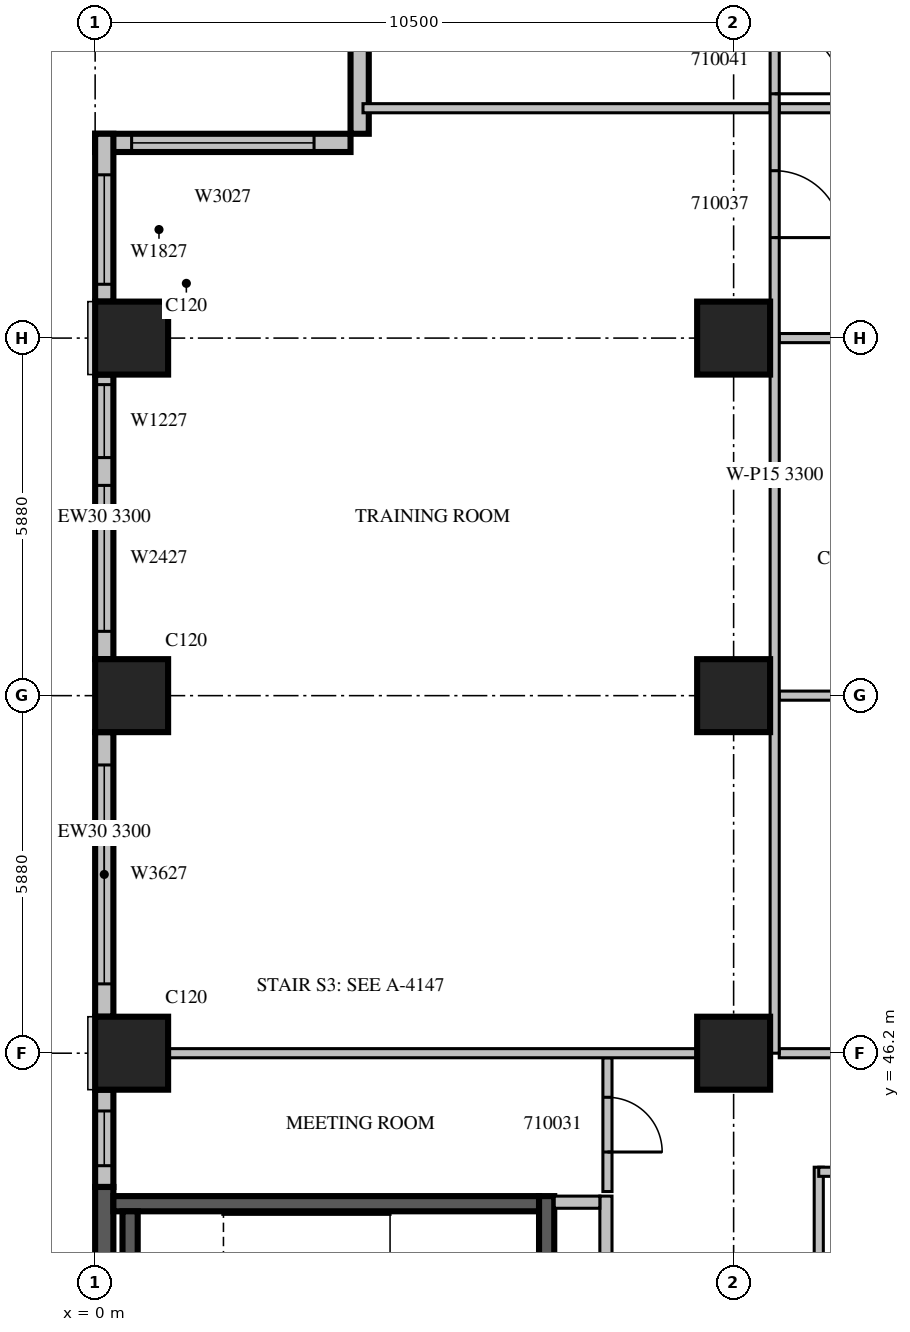
"""IFC4 building model, lengths in metres.
Left out: names, types, materials, properties, quantities, classifications, styles, units other than length and angle.
Written with IfcOpenShell. Run it as: python <this file> out.ifc"""

import sys

from ifc_helpers import new_model, si_unit, direction, frame, frame_2d, origin, origin_2d, place, context, subcontext, project, spatial, rectangle, extrude, source, transform, mapped, element, fill, save


model = new_model("IFC4")
c1 = context("Model", 3, precision=1e-05, world=origin(), true_north=direction((0.0, 1.0)))
c2 = subcontext(c1, "Body", "Model", "MODEL_VIEW")
j1 = project(units=[si_unit("LENGTHUNIT", "METRE"), si_unit("PLANEANGLEUNIT", "RADIAN")], contexts=[c1])
p1 = place(None, origin())
s1 = spatial("IfcSite", under=j1, at=p1, CompositionType="ELEMENT")
p2 = place(p1, origin())
s2 = spatial("IfcBuilding", under=s1, at=p2, CompositionType="ELEMENT")
p3 = place(p2, frame((0.0, 0.0, 53.1)))
s3 = spatial("IfcBuildingStorey", under=s2, at=p3, CompositionType="ELEMENT", Elevation=53.1)
m1 = source(origin(), c2, "Body", "SweptSolid", [
    extrude(rectangle(XDim=1.2, YDim=1.2, at=origin_2d()), origin(), (0.0, 0.0, 1.0), 4.2),
])
for number, where, z_axis, x_axis in (
    (1, (0.6, 46.2, 0.0), (0.0, 0.0, 1.0), (1.0, 0.0, 0.0)),
    (2, (10.5, 46.2, 0.0), (0.0, 0.0, 1.0), (1.0, 0.0, 0.0)),
    (3, (0.6, 52.08, 0.0), (0.0, 0.0, 1.0), (1.0, 0.0, 0.0)),
    (4, (10.5, 52.08, 0.0), (0.0, 0.0, 1.0), (1.0, 0.0, 0.0)),
    (5, (0.6, 57.96, 0.0), (0.0, 0.0, 1.0), (1.0, 0.0, 0.0)),
    (6, (10.5, 57.96, 0.0), (0.0, 0.0, 1.0), (1.0, 0.0, 0.0)),
):
    element("IfcColumn", number, at=place(p3, frame(where, z_axis=z_axis, x_axis=x_axis)), inside=s3, PredefinedType="COLUMN", context=c2, shape_type="MappedRepresentation", body=[
        mapped(m1, transform((0.0, 0.0, 0.0), scale=1.0)),
    ])
m2 = source(origin(), c2, "Body", "SweptSolid", [
    extrude(rectangle(XDim=4.2, YDim=0.3, at=frame_2d((2.1, 0.0))), origin(), (0.0, 0.0, 1.0), 3.8),
])
p4 = place(p3, frame((4.35, 65.52, 0.0), z_axis=(0.0, 0.0, 1.0), x_axis=(0.0, -1.0, 0.0)))
e7 = element("IfcWall", 7, at=p4, inside=s3, PredefinedType="STANDARD", context=c2, shape_type="MappedRepresentation", body=[
    mapped(m2, transform((0.0, 0.0, 0.0), scale=1.0)),
])
m3 = source(origin(), c2, "Body", "SweptSolid", [
    extrude(rectangle(XDim=1.2, YDim=2.7, at=frame_2d((0.6, 1.35))), frame((0.0, 0.16, 0.0), z_axis=(0.0, -1.0, 0.0), x_axis=(1.0, 0.0, 0.0)), (0.0, 0.0, 1.0), 0.32),
])
p5 = place(p4, frame((0.66, 0.0, 0.6)))
e8 = element("IfcOpeningElement", 8, at=p5, cuts=e7, PredefinedType="OPENING", context=c2, shape_type="MappedRepresentation", body=[
    mapped(m3, transform((0.0, 0.0, 0.0), scale=1.0)),
])
p6 = place(p3, frame((4.2, 61.17, 0.0), z_axis=(0.0, 0.0, 1.0), x_axis=(-1.0, 0.0, 0.0)))
e9 = element("IfcWall", 9, at=p6, inside=s3, PredefinedType="STANDARD", context=c2, shape_type="MappedRepresentation", body=[
    mapped(m2, transform((0.0, 0.0, 0.0), scale=1.0)),
])
m4 = source(origin(), c2, "Body", "SweptSolid", [
    extrude(rectangle(XDim=3.0, YDim=2.7, at=frame_2d((1.5, 1.35))), frame((0.0, 0.16, 0.0), z_axis=(0.0, -1.0, 0.0), x_axis=(1.0, 0.0, 0.0)), (0.0, 0.0, 1.0), 0.32),
])
p7 = place(p6, frame((0.6, 0.0, 0.6)))
e10 = element("IfcOpeningElement", 10, at=p7, cuts=e9, PredefinedType="OPENING", context=c2, shape_type="MappedRepresentation", body=[
    mapped(m4, transform((0.0, 0.0, 0.0), scale=1.0)),
])
m5 = source(origin(), c2, "Body", "SweptSolid", [
    extrude(rectangle(XDim=2.76, YDim=0.3, at=frame_2d((1.38, 0.0))), origin(), (0.0, 0.0, 1.0), 3.8),
])
p8 = place(p3, frame((0.15, 61.32, 0.0), z_axis=(0.0, 0.0, 1.0), x_axis=(0.0, -1.0, 0.0)))
e11 = element("IfcWall", 11, at=p8, inside=s3, PredefinedType="STANDARD", context=c2, shape_type="MappedRepresentation", body=[
    mapped(m5, transform((0.0, 0.0, 0.0), scale=1.0)),
])
m6 = source(origin(), c2, "Body", "SweptSolid", [
    extrude(rectangle(XDim=1.8, YDim=2.7, at=frame_2d((0.9, 1.35))), frame((0.0, 0.16, 0.0), z_axis=(0.0, -1.0, 0.0), x_axis=(1.0, 0.0, 0.0)), (0.0, 0.0, 1.0), 0.32),
])
p9 = place(p8, frame((0.675, 0.0, 0.6)))
e12 = element("IfcOpeningElement", 12, at=p9, cuts=e11, PredefinedType="OPENING", context=c2, shape_type="MappedRepresentation", body=[
    mapped(m6, transform((0.0, 0.0, 0.0), scale=1.0)),
])
m7 = source(origin(), c2, "Body", "SweptSolid", [
    extrude(rectangle(XDim=4.68, YDim=0.3, at=frame_2d((2.34, 0.0))), origin(), (0.0, 0.0, 1.0), 3.3),
])
p10 = place(p3, frame((0.15, 57.36, 0.0), z_axis=(0.0, 0.0, 1.0), x_axis=(0.0, -1.0, 0.0)))
e13 = element("IfcWall", 13, at=p10, inside=s3, PredefinedType="STANDARD", context=c2, shape_type="MappedRepresentation", body=[
    mapped(m7, transform((0.0, 0.0, 0.0), scale=1.0)),
])
p11 = place(p10, frame((0.165, 0.0, 0.6)))
e14 = element("IfcOpeningElement", 14, at=p11, cuts=e13, PredefinedType="OPENING", context=c2, shape_type="MappedRepresentation", body=[
    mapped(m3, transform((0.0, 0.0, 0.0), scale=1.0)),
])
m8 = source(origin(), c2, "Body", "SweptSolid", [
    extrude(rectangle(XDim=2.4, YDim=2.7, at=frame_2d((1.2, 1.35))), frame((0.0, 0.16, 0.0), z_axis=(0.0, -1.0, 0.0), x_axis=(1.0, 0.0, 0.0)), (0.0, 0.0, 1.0), 0.32),
])
p12 = place(p10, frame((1.823, 0.0, 0.6)))
e15 = element("IfcOpeningElement", 15, at=p12, cuts=e13, PredefinedType="OPENING", context=c2, shape_type="MappedRepresentation", body=[
    mapped(m8, transform((0.0, 0.0, 0.0), scale=1.0)),
])
p13 = place(p3, frame((0.15, 51.48, 0.0), z_axis=(0.0, 0.0, 1.0), x_axis=(0.0, -1.0, 0.0)))
e16 = element("IfcWall", 16, at=p13, inside=s3, PredefinedType="STANDARD", context=c2, shape_type="MappedRepresentation", body=[
    mapped(m7, transform((0.0, 0.0, 0.0), scale=1.0)),
])
m9 = source(origin(), c2, "Body", "SweptSolid", [
    extrude(rectangle(XDim=3.6, YDim=2.7, at=frame_2d((1.8, 1.35))), frame((0.0, 0.16, 0.0), z_axis=(0.0, -1.0, 0.0), x_axis=(1.0, 0.0, 0.0)), (0.0, 0.0, 1.0), 0.32),
])
p14 = place(p13, frame((0.54, 0.0, 0.6)))
e17 = element("IfcOpeningElement", 17, at=p14, cuts=e16, PredefinedType="OPENING", context=c2, shape_type="MappedRepresentation", body=[
    mapped(m9, transform((0.0, 0.0, 0.0), scale=1.0)),
])
m10 = source(origin(), c2, "Body", "SweptSolid", [
    extrude(rectangle(XDim=1.6, YDim=0.3, at=frame_2d((0.8, 0.0))), origin(), (0.0, 0.0, 1.0), 3.8),
])
p15 = place(p3, frame((0.15, 45.6, 0.0), z_axis=(0.0, 0.0, 1.0), x_axis=(0.0, -1.0, 0.0)))
e18 = element("IfcWall", 18, at=p15, inside=s3, PredefinedType="STANDARD", context=c2, shape_type="MappedRepresentation", body=[
    mapped(m10, transform((0.0, 0.0, 0.0), scale=1.0)),
])
m11 = source(origin(), c2, "Body", "SweptSolid", [
    extrude(rectangle(XDim=0.9, YDim=2.7, at=frame_2d((0.45, 1.35))), frame((0.0, 0.16, 0.0), z_axis=(0.0, -1.0, 0.0), x_axis=(1.0, 0.0, 0.0)), (0.0, 0.0, 1.0), 0.32),
])
p16 = place(p15, frame((0.35, 0.0, 0.6)))
e19 = element("IfcOpeningElement", 19, at=p16, cuts=e18, PredefinedType="OPENING", context=c2, shape_type="MappedRepresentation", body=[
    mapped(m11, transform((0.0, 0.0, 0.0), scale=1.0)),
])
m12 = source(origin(), c2, "Body", "SweptSolid", [
    extrude(rectangle(XDim=3.8, YDim=0.3, at=frame_2d((1.9, 0.0))), origin(), (0.0, 0.0, 1.0), 3.8),
])
p17 = place(p3, frame((0.15, 44.0, 0.0), z_axis=(0.0, 0.0, 1.0), x_axis=(0.0, -1.0, 0.0)))
e20 = element("IfcWall", 20, at=p17, inside=s3, PredefinedType="SOLIDWALL", context=c2, shape_type="MappedRepresentation", body=[
    mapped(m12, transform((0.0, 0.0, 0.0), scale=1.0)),
])
m13 = source(origin(), c2, "Body", "SweptSolid", [
    extrude(rectangle(XDim=7.0, YDim=0.25, at=frame_2d((3.5, 0.0))), origin(), (0.0, 0.0, 1.0), 3.8),
])
p18 = place(p3, frame((0.3, 43.725, 0.0), z_axis=(0.0, 0.0, 1.0), x_axis=(1.0, 0.0, 0.0)))
e21 = element("IfcWall", 21, at=p18, inside=s3, PredefinedType="SOLIDWALL", context=c2, shape_type="MappedRepresentation", body=[
    mapped(m13, transform((0.0, 0.0, 0.0), scale=1.0)),
])
m14 = source(origin(), c2, "Body", "SweptSolid", [
    extrude(rectangle(XDim=3.45, YDim=0.25, at=frame_2d((1.725, 0.0))), origin(), (0.0, 0.0, 1.0), 3.8),
])
p19 = place(p3, frame((7.425, 40.4, 0.0), z_axis=(0.0, 0.0, 1.0), x_axis=(0.0, 1.0, 0.0)))
e22 = element("IfcWall", 22, at=p19, inside=s3, PredefinedType="SOLIDWALL", context=c2, shape_type="MappedRepresentation", body=[
    mapped(m14, transform((0.0, 0.0, 0.0), scale=1.0)),
])
m15 = source(origin(), c2, "Body", "SweptSolid", [
    extrude(rectangle(XDim=2.95, YDim=0.25, at=frame_2d((1.475, 0.0))), origin(), (0.0, 0.0, 1.0), 3.8),
])
p20 = place(p3, frame((0.575, 40.65, 0.0), z_axis=(0.0, 0.0, 1.0), x_axis=(0.0, 1.0, 0.0)))
e23 = element("IfcWall", 23, at=p20, inside=s3, PredefinedType="SOLIDWALL", context=c2, shape_type="MappedRepresentation", body=[
    mapped(m15, transform((0.0, 0.0, 0.0), scale=1.0)),
])
m16 = source(origin(), c2, "Body", "SweptSolid", [
    extrude(rectangle(XDim=5.45, YDim=0.2, at=frame_2d((2.725, 0.0))), origin(), (0.0, 0.0, 1.0), 3.8),
])
p21 = place(p3, frame((8.4, 38.4, 0.0), z_axis=(0.0, 0.0, 1.0), x_axis=(0.0, 1.0, 0.0)))
e24 = element("IfcWall", 24, at=p21, inside=s3, PredefinedType="PARTITIONING", context=c2, shape_type="MappedRepresentation", body=[
    mapped(m16, transform((0.0, 0.0, 0.0), scale=1.0)),
])
m17 = source(origin(), c2, "Body", "SweptSolid", [
    extrude(rectangle(XDim=1.2, YDim=2.1, at=frame_2d((0.6, 1.05))), frame((0.0, 0.11, 0.0), z_axis=(0.0, -1.0, 0.0), x_axis=(1.0, 0.0, 0.0)), (0.0, 0.0, 1.0), 0.22),
])
p22 = place(p21, frame((0.4, 0.0, 0.0)))
e25 = element("IfcOpeningElement", 25, at=p22, cuts=e24, PredefinedType="OPENING", context=c2, shape_type="MappedRepresentation", body=[
    mapped(m17, transform((0.0, 0.0, 0.0), scale=1.0)),
])
m18 = source(origin(), c2, "Body", "SweptSolid", [
    extrude(rectangle(XDim=0.9, YDim=2.1, at=frame_2d((0.45, 1.05))), frame((0.0, 0.11, 0.0), z_axis=(0.0, -1.0, 0.0), x_axis=(1.0, 0.0, 0.0)), (0.0, 0.0, 1.0), 0.22),
])
p23 = place(p21, frame((3.25, 0.0, 0.0)))
e26 = element("IfcOpeningElement", 26, at=p23, cuts=e24, PredefinedType="OPENING", context=c2, shape_type="MappedRepresentation", body=[
    mapped(m18, transform((0.0, 0.0, 0.0), scale=1.0)),
])
m19 = source(origin(), c2, "Body", "SweptSolid", [
    extrude(rectangle(XDim=0.75, YDim=0.2, at=frame_2d((0.375, 0.0))), origin(), (0.0, 0.0, 1.0), 3.8),
])
p24 = place(p3, frame((7.55, 43.75, 0.0), z_axis=(0.0, 0.0, 1.0), x_axis=(1.0, 0.0, 0.0)))
e27 = element("IfcWall", 27, at=p24, inside=s3, PredefinedType="PARTITIONING", context=c2, shape_type="MappedRepresentation", body=[
    mapped(m19, transform((0.0, 0.0, 0.0), scale=1.0)),
])
m20 = source(origin(), c2, "Body", "SweptSolid", [
    extrude(rectangle(XDim=6.45, YDim=0.15, at=frame_2d((3.225, 0.0))), origin(), (0.0, 0.0, 1.0), 3.8),
])
p25 = place(p3, frame((11.9, 44.325, 0.0), z_axis=(0.0, 0.0, 1.0), x_axis=(0.0, -1.0, 0.0)))
e28 = element("IfcWall", 28, at=p25, inside=s3, PredefinedType="PARTITIONING", context=c2, shape_type="MappedRepresentation", body=[
    mapped(m20, transform((0.0, 0.0, 0.0), scale=1.0)),
])
m21 = source(origin(), c2, "Body", "SweptSolid", [
    extrude(rectangle(XDim=3.175, YDim=0.15, at=frame_2d((1.587, 0.0))), origin(), (0.0, 0.0, 1.0), 3.8),
])
p26 = place(p3, frame((15.075, 44.25, 0.0), z_axis=(0.0, 0.0, 1.0), x_axis=(-1.0, 0.0, 0.0)))
e29 = element("IfcWall", 29, at=p26, inside=s3, PredefinedType="PARTITIONING", context=c2, shape_type="MappedRepresentation", body=[
    mapped(m21, transform((0.0, 0.0, 0.0), scale=1.0)),
])
m22 = source(origin(), c2, "Body", "SweptSolid", [
    extrude(rectangle(XDim=2.2, YDim=0.15, at=frame_2d((1.1, 0.0))), origin(), (0.0, 0.0, 1.0), 3.8),
])
p27 = place(p3, frame((8.425, 43.925, 0.0), z_axis=(0.0, 0.0, 1.0), x_axis=(0.0, 1.0, 0.0)))
e30 = element("IfcWall", 30, at=p27, inside=s3, PredefinedType="PARTITIONING", context=c2, shape_type="MappedRepresentation", body=[
    mapped(m22, transform((0.0, 0.0, 0.0), scale=1.0)),
])
m23 = source(origin(), c2, "Body", "SweptSolid", [
    extrude(rectangle(XDim=0.9, YDim=2.1, at=frame_2d((0.45, 1.05))), frame((0.0, 0.085, 0.0), z_axis=(0.0, -1.0, 0.0), x_axis=(1.0, 0.0, 0.0)), (0.0, 0.0, 1.0), 0.17),
])
p28 = place(p27, frame((0.65, 0.0, 0.0)))
e31 = element("IfcOpeningElement", 31, at=p28, cuts=e30, PredefinedType="OPENING", context=c2, shape_type="MappedRepresentation", body=[
    mapped(m23, transform((0.0, 0.0, 0.0), scale=1.0)),
])
m24 = source(origin(), c2, "Body", "SweptSolid", [
    extrude(rectangle(XDim=3.75, YDim=0.15, at=frame_2d((1.875, 0.0))), origin(), (0.0, 0.0, 1.0), 3.8),
])
for number, where, z_axis, x_axis in (
    (32, (15.0, 52.08, 0.0), (0.0, 0.0, 1.0), (-1.0, 0.0, 0.0)),
    (33, (15.0, 57.96, 0.0), (0.0, 0.0, 1.0), (-1.0, 0.0, 0.0)),
):
    element("IfcWall", number, at=place(p3, frame(where, z_axis=z_axis, x_axis=x_axis)), inside=s3, PredefinedType="PARTITIONING", context=c2, shape_type="MappedRepresentation", body=[
        mapped(m24, transform((0.0, 0.0, 0.0), scale=1.0)),
    ])
m25 = source(origin(), c2, "Body", "SweptSolid", [
    extrude(rectangle(XDim=8.702, YDim=0.15, at=frame_2d((4.351, 0.0))), origin(), (0.0, 0.0, 1.0), 3.8),
])
p29 = place(p3, frame((9.901, 46.2, 0.0), z_axis=(0.0, 0.0, 1.0), x_axis=(-1.0, 0.0, 0.0)))
e34 = element("IfcWall", 34, at=p29, inside=s3, PredefinedType="PARTITIONING", context=c2, shape_type="MappedRepresentation", body=[
    mapped(m25, transform((0.0, 0.0, 0.0), scale=1.0)),
])
p30 = place(p3, frame((15.0, 46.2, 0.0), z_axis=(0.0, 0.0, 1.0), x_axis=(-1.0, 0.0, 0.0)))
e35 = element("IfcWall", 35, at=p30, inside=s3, PredefinedType="PARTITIONING", context=c2, shape_type="MappedRepresentation", body=[
    mapped(m24, transform((0.0, 0.0, 0.0), scale=1.0)),
])
m26 = source(origin(), c2, "Body", "SweptSolid", [
    extrude(rectangle(XDim=6.695, YDim=0.15, at=frame_2d((3.348, 0.0))), origin(), (0.0, 0.0, 1.0), 3.8),
])
p31 = place(p3, frame((11.1, 61.74, 0.0), z_axis=(0.0, 0.0, 1.0), x_axis=(-1.0, 0.0, 0.0)))
e36 = element("IfcWall", 36, at=p31, inside=s3, PredefinedType="PARTITIONING", context=c2, shape_type="MappedRepresentation", body=[
    mapped(m26, transform((0.0, 0.0, 0.0), scale=1.0)),
])
p32 = place(p3, frame((15.0, 61.74, 0.0), z_axis=(0.0, 0.0, 1.0), x_axis=(-1.0, 0.0, 0.0)))
e37 = element("IfcWall", 37, at=p32, inside=s3, PredefinedType="PARTITIONING", context=c2, shape_type="MappedRepresentation", body=[
    mapped(m24, transform((0.0, 0.0, 0.0), scale=1.0)),
])
m27 = source(origin(), c2, "Body", "SweptSolid", [
    extrude(rectangle(XDim=19.02, YDim=0.15, at=frame_2d((9.51, 0.0))), origin(), (0.0, 0.0, 1.0), 3.3),
])
p33 = place(p3, frame((11.175, 46.2, 0.0), z_axis=(0.0, 0.0, 1.0), x_axis=(0.0, 1.0, 0.0)))
e38 = element("IfcWall", 38, at=p33, inside=s3, PredefinedType="PARTITIONING", context=c2, shape_type="MappedRepresentation", body=[
    mapped(m27, transform((0.0, 0.0, 0.0), scale=1.0)),
])
m28 = source(origin(), c2, "Body", "SweptSolid", [
    extrude(rectangle(XDim=1.1, YDim=2.1, at=frame_2d((0.55, 1.05))), frame((0.0, 0.085, 0.0), z_axis=(0.0, -1.0, 0.0), x_axis=(1.0, 0.0, 0.0)), (0.0, 0.0, 1.0), 0.17),
])
p34 = place(p33, frame((13.412, 0.0, 0.0)))
e39 = element("IfcOpeningElement", 39, at=p34, cuts=e38, PredefinedType="OPENING", context=c2, shape_type="MappedRepresentation", body=[
    mapped(m28, transform((0.0, 0.0, 0.0), scale=1.0)),
])
p35 = place(p33, frame((15.777, 0.0, 0.0)))
e40 = element("IfcOpeningElement", 40, at=p35, cuts=e38, PredefinedType="OPENING", context=c2, shape_type="MappedRepresentation", body=[
    mapped(m28, transform((0.0, 0.0, 0.0), scale=1.0)),
])
m29 = source(origin(), c2, "Body", "SweptSolid", [
    extrude(rectangle(XDim=3.0, YDim=2.7, at=frame_2d((1.5, 1.35))), frame((0.0, 0.03, 0.0), z_axis=(0.0, -1.0, 0.0), x_axis=(1.0, 0.0, 0.0)), (0.0, 0.0, 1.0), 0.06),
])
p36 = place(p7, origin())
e41 = element("IfcWindow", 41, at=p36, inside=s3, PartitioningType="SINGLE_PANEL", PredefinedType="WINDOW", context=c2, shape_type="MappedRepresentation", body=[
    mapped(m29, transform((0.0, 0.0, 0.0), scale=1.0)),
])
fill(e10, e41)
m30 = source(origin(), c2, "Body", "SweptSolid", [
    extrude(rectangle(XDim=1.8, YDim=2.7, at=frame_2d((0.9, 1.35))), frame((0.0, 0.03, 0.0), z_axis=(0.0, -1.0, 0.0), x_axis=(1.0, 0.0, 0.0)), (0.0, 0.0, 1.0), 0.06),
])
p37 = place(p9, origin())
e42 = element("IfcWindow", 42, at=p37, inside=s3, PartitioningType="SINGLE_PANEL", PredefinedType="WINDOW", context=c2, shape_type="MappedRepresentation", body=[
    mapped(m30, transform((0.0, 0.0, 0.0), scale=1.0)),
])
fill(e12, e42)
m31 = source(origin(), c2, "Body", "SweptSolid", [
    extrude(rectangle(XDim=1.2, YDim=2.7, at=frame_2d((0.6, 1.35))), frame((0.0, 0.03, 0.0), z_axis=(0.0, -1.0, 0.0), x_axis=(1.0, 0.0, 0.0)), (0.0, 0.0, 1.0), 0.06),
])
p38 = place(p11, origin())
e43 = element("IfcWindow", 43, at=p38, inside=s3, PartitioningType="SINGLE_PANEL", PredefinedType="WINDOW", context=c2, shape_type="MappedRepresentation", body=[
    mapped(m31, transform((0.0, 0.0, 0.0), scale=1.0)),
])
fill(e14, e43)
m32 = source(origin(), c2, "Body", "SweptSolid", [
    extrude(rectangle(XDim=2.4, YDim=2.7, at=frame_2d((1.2, 1.35))), frame((0.0, 0.03, 0.0), z_axis=(0.0, -1.0, 0.0), x_axis=(1.0, 0.0, 0.0)), (0.0, 0.0, 1.0), 0.06),
])
p39 = place(p12, origin())
e44 = element("IfcWindow", 44, at=p39, inside=s3, PartitioningType="SINGLE_PANEL", PredefinedType="WINDOW", context=c2, shape_type="MappedRepresentation", body=[
    mapped(m32, transform((0.0, 0.0, 0.0), scale=1.0)),
])
fill(e15, e44)
m33 = source(origin(), c2, "Body", "SweptSolid", [
    extrude(rectangle(XDim=3.6, YDim=2.7, at=frame_2d((1.8, 1.35))), frame((0.0, 0.03, 0.0), z_axis=(0.0, -1.0, 0.0), x_axis=(1.0, 0.0, 0.0)), (0.0, 0.0, 1.0), 0.06),
])
p40 = place(p14, origin())
e45 = element("IfcWindow", 45, at=p40, inside=s3, PartitioningType="SINGLE_PANEL", PredefinedType="WINDOW", context=c2, shape_type="MappedRepresentation", body=[
    mapped(m33, transform((0.0, 0.0, 0.0), scale=1.0)),
])
fill(e17, e45)
m34 = source(origin(), c2, "Body", "SweptSolid", [
    extrude(rectangle(XDim=0.9, YDim=2.7, at=frame_2d((0.45, 1.35))), frame((0.0, 0.03, 0.0), z_axis=(0.0, -1.0, 0.0), x_axis=(1.0, 0.0, 0.0)), (0.0, 0.0, 1.0), 0.06),
])
p41 = place(p16, origin())
e46 = element("IfcWindow", 46, at=p41, inside=s3, PartitioningType="SINGLE_PANEL", PredefinedType="WINDOW", context=c2, shape_type="MappedRepresentation", body=[
    mapped(m34, transform((0.0, 0.0, 0.0), scale=1.0)),
])
fill(e19, e46)
m35 = source(origin(), c2, "Body", "SweptSolid", [
    extrude(rectangle(XDim=0.9, YDim=2.1, at=frame_2d((0.45, 1.05))), frame((0.0, 0.025, 0.0), z_axis=(0.0, -1.0, 0.0), x_axis=(1.0, 0.0, 0.0)), (0.0, 0.0, 1.0), 0.05),
])
p42 = place(p28, origin())
e47 = element("IfcDoor", 47, at=p42, inside=s3, OperationType="SINGLE_SWING_RIGHT", PredefinedType="DOOR", context=c2, shape_type="MappedRepresentation", body=[
    mapped(m35, transform((0.0, 0.0, 0.0), scale=1.0)),
])
fill(e31, e47)
m36 = source(origin(), c2, "Body", "SweptSolid", [
    extrude(rectangle(XDim=1.1, YDim=2.1, at=frame_2d((0.55, 1.05))), frame((0.0, 0.025, 0.0), z_axis=(0.0, -1.0, 0.0), x_axis=(1.0, 0.0, 0.0)), (0.0, 0.0, 1.0), 0.05),
])
p43 = place(p34, origin())
e48 = element("IfcDoor", 48, at=p43, inside=s3, OperationType="SINGLE_SWING_RIGHT", PredefinedType="DOOR", context=c2, shape_type="MappedRepresentation", body=[
    mapped(m36, transform((0.0, 0.0, 0.0), scale=1.0)),
])
fill(e39, e48)
p44 = place(p35, origin())
e49 = element("IfcDoor", 49, at=p44, inside=s3, OperationType="SINGLE_SWING_RIGHT", PredefinedType="DOOR", context=c2, shape_type="MappedRepresentation", body=[
    mapped(m36, transform((0.0, 0.0, 0.0), scale=1.0)),
])
fill(e40, e49)
save(model, sys.argv[1])
